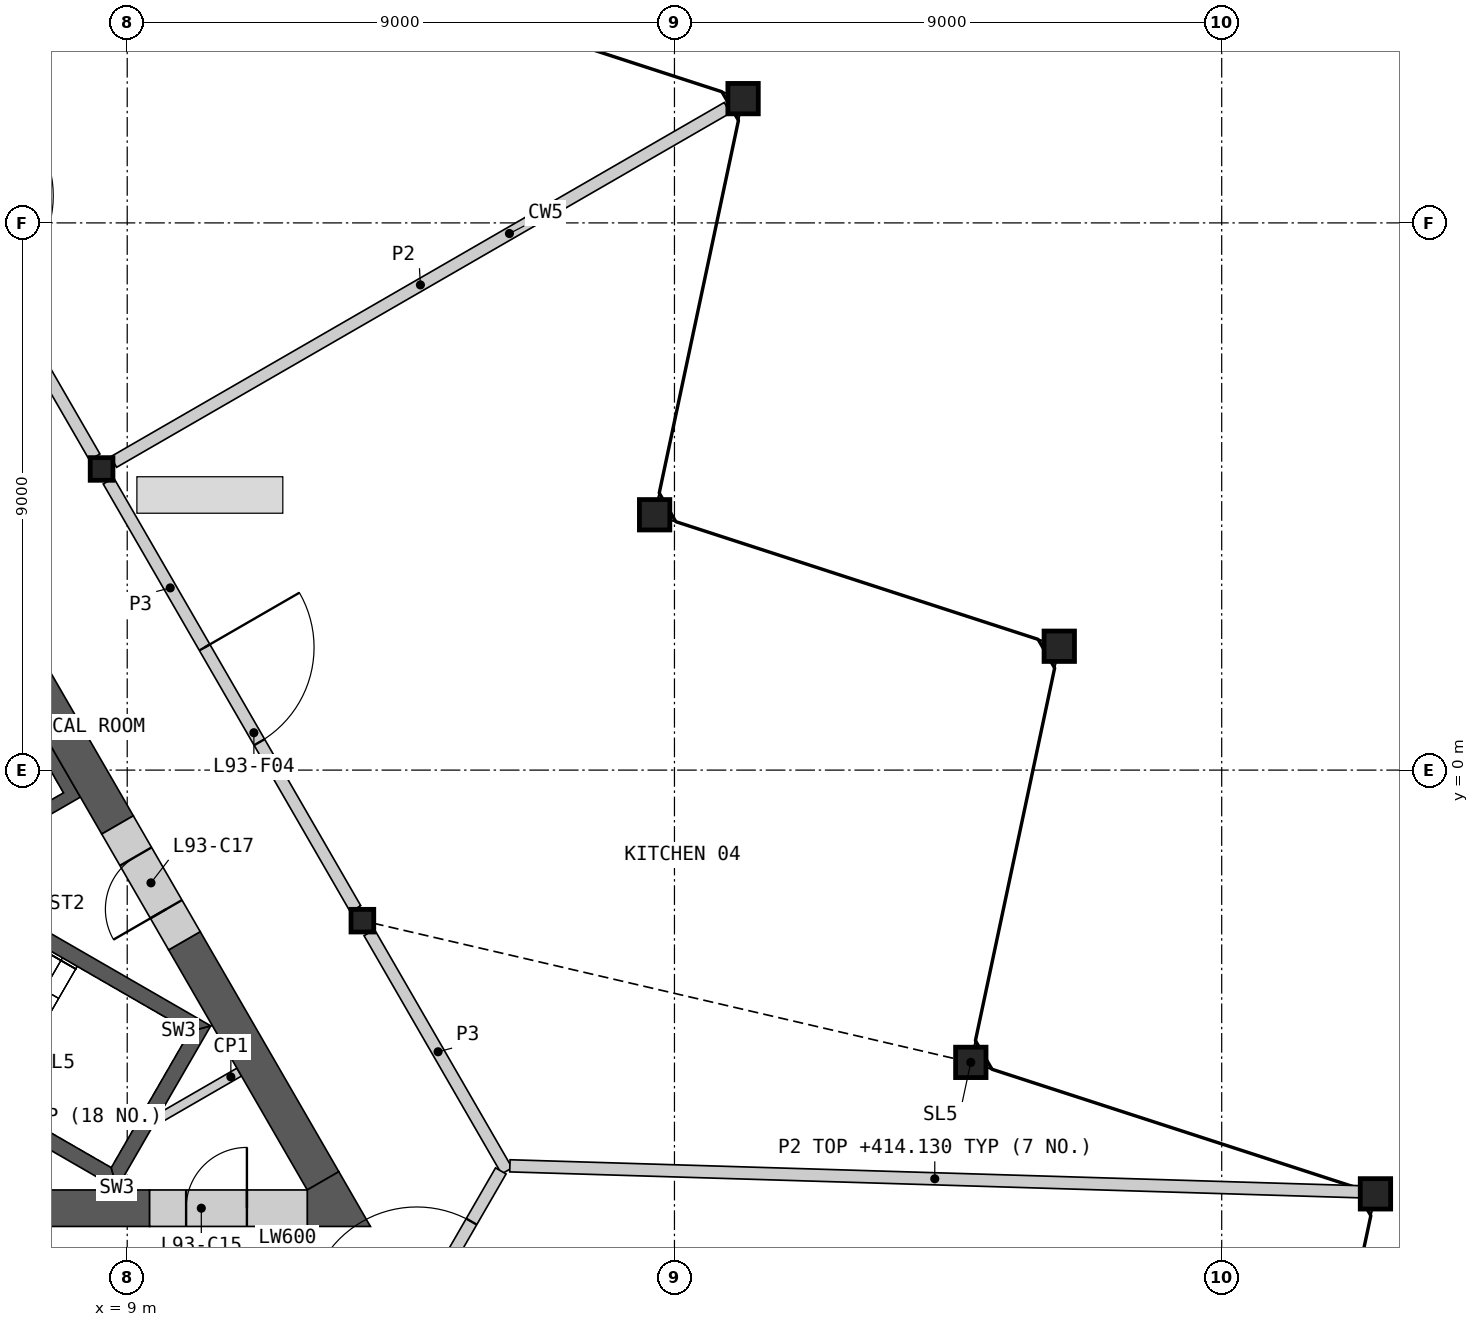
"""IFC4 building model, lengths in metres.
Left out: names, types, materials, properties, quantities, classifications, styles, units other than length and angle.
Written with IfcOpenShell. Run it as: python <this file> out.ifc"""

import sys

from ifc_helpers import new_model, si_unit, direction, frame, frame_2d, origin, origin_2d, place, context, subcontext, project, spatial, polyline, rectangle, hollow_rectangle, i_section, outline, extrude, element, fill, save


model = new_model("IFC4")
c1 = context("Model", 3, precision=1e-05, world=origin(), true_north=direction((0.0, 1.0)))
c2 = subcontext(c1, "Body", "Model", "MODEL_VIEW")
j1 = project(units=[si_unit("LENGTHUNIT", "METRE"), si_unit("PLANEANGLEUNIT", "RADIAN")], contexts=[c1])
p1 = place(None, origin())
s1 = spatial("IfcSite", under=j1, at=p1, CompositionType="ELEMENT")
p2 = place(p1, origin())
s2 = spatial("IfcBuilding", under=s1, at=p2, CompositionType="ELEMENT")
p3 = place(p2, frame((0.0, 0.0, 405.2)))
s3 = spatial("IfcBuildingStorey", under=s2, at=p3, CompositionType="ELEMENT", Elevation=405.2)
for number, where, z_axis, x_axis in (
    (1, (29.529, -6.969, 0.0), (0.0, 0.0, 1.0), (1.0, 0.0, 0.0)),
    (2, (22.874, -4.807, 0.0), (0.0, 0.0, 1.0), (1.0, 0.0, 0.0)),
    (3, (24.329, 2.037, 0.0), (0.0, 0.0, 1.0), (1.0, 0.0, 0.0)),
    (4, (17.674, 4.199, 0.0), (0.0, 0.0, 1.0), (1.0, 0.0, 0.0)),
    (5, (19.129, 11.044, 0.0), (0.0, 0.0, 1.0), (1.0, 0.0, 0.0)),
):
    element("IfcColumn", number, at=place(p3, frame(where, z_axis=z_axis, x_axis=x_axis)), inside=s3, PredefinedType="COLUMN", context=c2, shape_type="SweptSolid", body=[
        extrude(hollow_rectangle(XDim=0.5, YDim=0.5, WallThickness=0.03, at=origin_2d()), origin(), (0.0, 0.0, 1.0), 10.0),
    ])
for number, where, z_axis, x_axis in (
    (6, (12.868, -2.476, 0.0), (0.0, 0.0, 1.0), (1.0, 0.0, 0.0)),
    (7, (8.578, 4.953, 0.0), (0.0, 0.0, 1.0), (1.0, 0.0, 0.0)),
):
    element("IfcColumn", number, at=place(p3, frame(where, z_axis=z_axis, x_axis=x_axis)), inside=s3, PredefinedType="COLUMN", context=c2, shape_type="SweptSolid", body=[
        extrude(i_section(OverallWidth=0.374, OverallDepth=0.372, WebThickness=0.016, FlangeThickness=0.026, at=origin_2d()), origin(), (0.0, 0.0, 1.0), 10.0),
    ])
p4 = place(p3, origin())
e8 = element("IfcWall", 8, at=p4, inside=s3, PredefinedType="SHEAR", context=c2, shape_type="SweptSolid", body=[
    extrude(outline(polyline([(1.561, 6.097), (3.731, 7.35), (8.231, -0.444), (6.061, -1.697), (5.96, -1.524), (7.952, -0.374), (6.952, 1.358), (4.96, 0.208), (4.861, 0.381), (6.852, 1.531), (5.852, 3.263), (3.861, 2.113), (3.76, 2.287), (5.752, 3.437), (4.752, 5.169), (2.76, 4.019), (2.66, 4.192), (4.652, 5.342), (3.652, 7.074), (1.66, 5.924), (1.561, 6.097)])), origin(), (0.0, 0.0, 1.0), 9.7),
])
p5 = place(p3, origin())
e9 = element("IfcWall", 9, at=p5, inside=s3, PredefinedType="SHEAR", context=c2, shape_type="SweptSolid", body=[
    extrude(outline(polyline([(3.763, -3.956), (8.83, -6.881), (8.738, -6.539), (3.888, -3.739), (3.763, -3.956)])), origin(), (0.0, 0.0, 1.0), 9.7),
])
p6 = place(p3, origin())
e10 = element("IfcWall", 10, at=p6, inside=s3, PredefinedType="SHEAR", context=c2, shape_type="SweptSolid", body=[
    extrude(outline(polyline([(8.83, -6.881), (10.374, -4.206), (10.032, -4.298), (8.738, -6.539), (8.83, -6.881)])), origin(), (0.0, 0.0, 1.0), 9.7),
])
p7 = place(p3, origin())
e11 = element("IfcWall", 11, at=p7, inside=s3, PredefinedType="SHEAR", context=c2, shape_type="SweptSolid", body=[
    extrude(outline(polyline([(10.032, -4.298), (10.374, -4.206), (5.307, -1.281), (5.182, -1.498), (10.032, -4.298)])), origin(), (0.0, 0.0, 1.0), 9.7),
])
p8 = place(p3, frame((10.842, -4.967, 0.0), z_axis=(0.0, 0.0, 1.0), x_axis=(-0.866098216386, -0.499873863663, 0.0)))
e12 = element("IfcWall", 12, at=p8, inside=s3, PredefinedType="PARTITIONING", context=c2, shape_type="SweptSolid", body=[
    extrude(rectangle(XDim=1.582, YDim=0.15, at=frame_2d((0.791, 0.0))), origin(), (0.0, 0.0, 1.0), 9.7),
])
p9 = place(p3, frame((-4.892, -7.206, 0.0), z_axis=(0.0, 0.0, 1.0), x_axis=(1.0, 0.0, 0.0)))
e13 = element("IfcWall", 13, at=p9, inside=s3, PredefinedType="SHEAR", context=c2, shape_type="SweptSolid", body=[
    extrude(rectangle(XDim=14.261, YDim=0.6, at=frame_2d((7.13, 0.0))), origin(), (0.0, 0.0, 1.0), 9.7),
])
p10 = place(p3, frame((8.841, -0.902, 0.0), z_axis=(0.0, 0.0, 1.0), x_axis=(-0.499995618375, 0.866027933502, 0.0)))
e14 = element("IfcWall", 14, at=p10, inside=s3, PredefinedType="SHEAR", context=c2, shape_type="SweptSolid", body=[
    extrude(rectangle(XDim=14.571, YDim=0.6, at=frame_2d((7.285, 0.0))), origin(), (0.0, 0.0, 1.0), 9.7),
])
p11 = place(p3, frame((12.221, -6.756, 0.0), z_axis=(0.0, 0.0, 1.0), x_axis=(-0.500020646047, 0.866013483456, 0.0)))
e15 = element("IfcWall", 15, at=p11, inside=s3, PredefinedType="SHEAR", context=c2, shape_type="SweptSolid", body=[
    extrude(rectangle(XDim=4.559, YDim=0.6, at=frame_2d((2.28, 0.0))), origin(), (0.0, 0.0, 1.0), 9.7),
])
p12 = place(p3, origin())
e16 = element("IfcWall", 16, at=p12, inside=s3, PredefinedType="SHEAR", context=c2, shape_type="SweptSolid", body=[
    extrude(outline(polyline([(11.961, -7.506), (11.961, -6.906), (12.48, -6.606), (13.0, -7.506), (11.961, -7.506)])), origin(), (0.0, 0.0, 1.0), 9.7),
])
p13 = place(p3, frame((9.369, -7.206, 0.0), z_axis=(0.0, 0.0, 1.0), x_axis=(1.0, 0.0, 0.0)))
e17 = element("IfcWall", 17, at=p13, inside=s3, PredefinedType="SHEAR", context=c2, shape_type="SweptSolid", body=[
    extrude(rectangle(XDim=2.592, YDim=0.6, at=frame_2d((1.296, 0.0))), origin(), (0.0, 0.0, 1.0), 9.7),
])
p14 = place(p13, frame((0.6, 0.0, 0.0)))
e18 = element("IfcOpeningElement", 18, at=p14, cuts=e17, PredefinedType="OPENING", context=c2, shape_type="SweptSolid", body=[
    extrude(rectangle(XDim=1.0, YDim=2.1, at=frame_2d((0.5, 1.05))), frame((0.0, 0.31, 0.0), z_axis=(0.0, -1.0, 0.0), x_axis=(1.0, 0.0, 0.0)), (0.0, 0.0, 1.0), 0.62),
])
p15 = place(p3, frame((9.941, -2.807, 0.0), z_axis=(0.0, 0.0, 1.0), x_axis=(-0.499994660107, 0.866028486751, 0.0)))
e19 = element("IfcWall", 19, at=p15, inside=s3, PredefinedType="SHEAR", context=c2, shape_type="SweptSolid", body=[
    extrude(rectangle(XDim=2.2, YDim=0.6, at=frame_2d((1.1, 0.0))), origin(), (0.0, 0.0, 1.0), 9.7),
])
p16 = place(p15, frame((0.6, 0.0, 0.0)))
e20 = element("IfcOpeningElement", 20, at=p16, cuts=e19, PredefinedType="OPENING", context=c2, shape_type="SweptSolid", body=[
    extrude(rectangle(XDim=1.0, YDim=2.1, at=frame_2d((0.5, 1.05))), frame((0.0, 0.31, 0.0), z_axis=(0.0, -1.0, 0.0), x_axis=(1.0, 0.0, 0.0)), (0.0, 0.0, 1.0), 0.62),
])
p17 = place(p3, frame((4.403, 12.185, 0.0), z_axis=(0.0, 0.0, 1.0), x_axis=(0.499992155518, -0.866029932751, 0.0)))
e21 = element("IfcWall", 21, at=p17, inside=s3, PredefinedType="PARTITIONING", context=c2, shape_type="SweptSolid", body=[
    extrude(rectangle(XDim=8.123, YDim=0.2, at=frame_2d((4.062, 0.0))), origin(), (0.0, 0.0, 1.0), 9.7),
])
p18 = place(p17, frame((3.162, 0.0, 0.0)))
e22 = element("IfcOpeningElement", 22, at=p18, cuts=e21, PredefinedType="OPENING", context=c2, shape_type="SweptSolid", body=[
    extrude(rectangle(XDim=1.8, YDim=2.1, at=frame_2d((0.9, 1.05))), frame((0.0, 0.11, 0.0), z_axis=(0.0, -1.0, 0.0), x_axis=(1.0, 0.0, 0.0)), (0.0, 0.0, 1.0), 0.22),
])
p19 = place(p3, frame((8.692, 4.756, 0.0), z_axis=(0.0, 0.0, 1.0), x_axis=(0.500001682468, -0.866024432409, 0.0)))
e23 = element("IfcWall", 23, at=p19, inside=s3, PredefinedType="PARTITIONING", context=c2, shape_type="SweptSolid", body=[
    extrude(rectangle(XDim=8.124, YDim=0.2, at=frame_2d((4.062, 0.0))), origin(), (0.0, 0.0, 1.0), 9.7),
])
p20 = place(p19, frame((3.162, 0.0, 0.0)))
e24 = element("IfcOpeningElement", 24, at=p20, cuts=e23, PredefinedType="OPENING", context=c2, shape_type="SweptSolid", body=[
    extrude(rectangle(XDim=1.8, YDim=2.1, at=frame_2d((0.9, 1.05))), frame((0.0, 0.11, 0.0), z_axis=(0.0, -1.0, 0.0), x_axis=(1.0, 0.0, 0.0)), (0.0, 0.0, 1.0), 0.22),
])
p21 = place(p3, frame((12.981, -2.673, 0.0), z_axis=(0.0, 0.0, 1.0), x_axis=(0.499974648164, -0.866040040179, 0.0)))
e25 = element("IfcWall", 25, at=p21, inside=s3, PredefinedType="PARTITIONING", context=c2, shape_type="SweptSolid", body=[
    extrude(rectangle(XDim=4.525, YDim=0.2, at=frame_2d((2.263, 0.0))), origin(), (0.0, 0.0, 1.0), 9.7),
])
p22 = place(p3, frame((13.281, -9.819, 0.0), z_axis=(0.0, 0.0, 1.0), x_axis=(0.499958791762, 0.866049194065, 0.0)))
e26 = element("IfcWall", 26, at=p22, inside=s3, PredefinedType="PARTITIONING", context=c2, shape_type="SweptSolid", body=[
    extrude(rectangle(XDim=3.726, YDim=0.2, at=frame_2d((1.863, 0.0))), origin(), (0.0, 0.0, 1.0), 9.7),
])
p23 = place(p22, frame((0.963, 0.0, 0.0)))
e27 = element("IfcOpeningElement", 27, at=p23, cuts=e26, PredefinedType="OPENING", context=c2, shape_type="SweptSolid", body=[
    extrude(rectangle(XDim=1.8, YDim=2.1, at=frame_2d((0.9, 1.05))), frame((0.0, 0.11, 0.0), z_axis=(0.0, -1.0, 0.0), x_axis=(1.0, 0.0, 0.0)), (0.0, 0.0, 1.0), 0.22),
])
p24 = place(p3, frame((15.294, -6.509, 0.0), z_axis=(0.0, 0.0, 1.0), x_axis=(0.999534054826, -0.03052332293, 0.0)))
e28 = element("IfcWall", 28, at=p24, inside=s3, PredefinedType="PARTITIONING", context=c2, shape_type="SweptSolid", body=[
    extrude(rectangle(XDim=13.981, YDim=0.2, at=frame_2d((6.991, 0.0))), origin(), (0.0, 0.0, 1.0), 8.93),
])
p25 = place(p3, frame((8.775, 5.066, 0.0), z_axis=(0.0, 0.0, 1.0), x_axis=(0.866023724155, 0.500002909193, 0.0)))
e29 = element("IfcWall", 29, at=p25, inside=s3, PredefinedType="PARTITIONING", context=c2, shape_type="SweptSolid", body=[
    extrude(rectangle(XDim=11.655, YDim=0.2, at=frame_2d((5.827, 0.0))), origin(), (0.0, 0.0, 1.0), 8.93),
])
p26 = place(p14, origin())
e30 = element("IfcDoor", 30, at=p26, inside=s3, OperationType="SINGLE_SWING_RIGHT", PredefinedType="DOOR", context=c2, shape_type="SweptSolid", body=[
    extrude(rectangle(XDim=1.0, YDim=2.1, at=frame_2d((0.5, 1.05))), frame((0.0, 0.055, 0.0), z_axis=(0.0, -1.0, 0.0), x_axis=(1.0, 0.0, 0.0)), (0.0, 0.0, 1.0), 0.05),
])
fill(e18, e30)
p27 = place(p16, origin())
e31 = element("IfcDoor", 31, at=p27, inside=s3, OperationType="SINGLE_SWING_LEFT", PredefinedType="DOOR", context=c2, shape_type="SweptSolid", body=[
    extrude(rectangle(XDim=1.0, YDim=2.1, at=frame_2d((0.5, 1.05))), frame((0.0, 0.055, 0.0), z_axis=(0.0, -1.0, 0.0), x_axis=(1.0, 0.0, 0.0)), (0.0, 0.0, 1.0), 0.05),
])
fill(e20, e31)
p28 = place(p23, origin())
e32 = element("IfcDoor", 32, at=p28, inside=s3, OperationType="DOUBLE_DOOR_SINGLE_SWING", PredefinedType="DOOR", context=c2, shape_type="SweptSolid", body=[
    extrude(rectangle(XDim=1.8, YDim=2.1, at=frame_2d((0.9, 1.05))), frame((0.0, 0.025, 0.0), z_axis=(0.0, -1.0, 0.0), x_axis=(1.0, 0.0, 0.0)), (0.0, 0.0, 1.0), 0.05),
])
fill(e27, e32)
p29 = place(p20, origin())
e33 = element("IfcDoor", 33, at=p29, inside=s3, OperationType="DOUBLE_DOOR_SINGLE_SWING", PredefinedType="DOOR", context=c2, shape_type="SweptSolid", body=[
    extrude(rectangle(XDim=1.8, YDim=2.1, at=frame_2d((0.9, 1.05))), frame((0.0, 0.025, 0.0), z_axis=(0.0, -1.0, 0.0), x_axis=(1.0, 0.0, 0.0)), (0.0, 0.0, 1.0), 0.05),
])
fill(e24, e33)
save(model, sys.argv[1])
